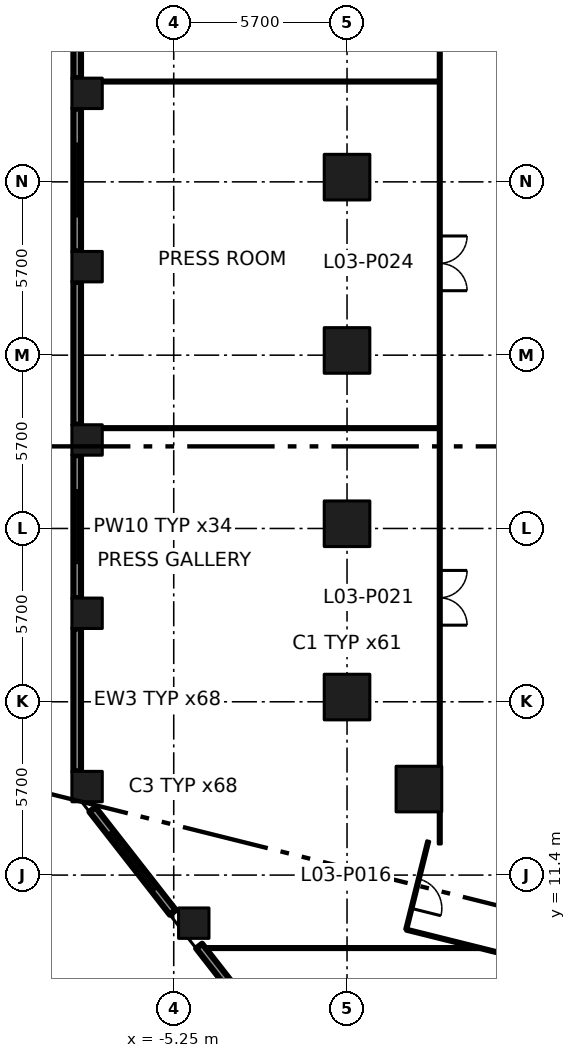
"""IFC4 building model, lengths in metres.
Left out: names, types, materials, properties, quantities, classifications, styles, units other than length and angle.
Written with IfcOpenShell. Run it as: python <this file> out.ifc"""

import sys

from ifc_helpers import new_model, si_unit, direction, frame, frame_2d, origin, origin_2d, place, context, subcontext, project, spatial, rectangle, extrude, element, fill, save


model = new_model("IFC4")
c1 = context("Model", 3, precision=1e-05, world=origin(), true_north=direction((0.0, 1.0)))
c2 = subcontext(c1, "Body", "Model", "MODEL_VIEW")
j1 = project(units=[si_unit("LENGTHUNIT", "METRE"), si_unit("PLANEANGLEUNIT", "RADIAN")], contexts=[c1])
p1 = place(None, origin())
s1 = spatial("IfcSite", under=j1, at=p1, CompositionType="ELEMENT")
p2 = place(p1, origin())
s2 = spatial("IfcBuilding", under=s1, at=p2, CompositionType="ELEMENT")
p3 = place(p2, frame((0.0, 0.0, 18.6)))
s3 = spatial("IfcBuildingStorey", under=s2, at=p3, CompositionType="ELEMENT", Elevation=18.6)
for number, where, z_axis, x_axis in (
    (1, (0.45, 17.255, 0.0), (0.0, 0.0, 1.0), (1.0, 0.0, 0.0)),
    (2, (0.45, 22.955, 0.0), (0.0, 0.0, 1.0), (1.0, 0.0, 0.0)),
    (3, (0.45, 28.655, 0.0), (0.0, 0.0, 1.0), (1.0, 0.0, 0.0)),
    (4, (0.45, 34.355, 0.0), (0.0, 0.0, 1.0), (1.0, 0.0, 0.0)),
    (5, (2.814, 14.229, 0.0), (0.0, 0.0, 1.0), (1.0, 0.0, 0.0)),
):
    element("IfcColumn", number, at=place(p3, frame(where, z_axis=z_axis, x_axis=x_axis)), inside=s3, PredefinedType="COLUMN", context=c2, shape_type="SweptSolid", body=[
        extrude(rectangle(XDim=1.5, YDim=1.5, at=origin_2d()), origin(), (0.0, 0.0, 1.0), 4.8),
    ])
for number, where, z_axis, x_axis in (
    (6, (-8.1, 14.311, 0.0), (0.0, 0.0, 1.0), (1.0, 0.0, 0.0)),
    (7, (-8.1, 20.011, 0.0), (0.0, 0.0, 1.0), (1.0, 0.0, 0.0)),
    (8, (-8.1, 25.711, 0.0), (0.0, 0.0, 1.0), (1.0, 0.0, 0.0)),
    (9, (-8.1, 31.411, 0.0), (0.0, 0.0, 1.0), (1.0, 0.0, 0.0)),
    (10, (-8.1, 37.111, 0.0), (0.0, 0.0, 1.0), (1.0, 0.0, 0.0)),
    (11, (-4.591, 9.819, 0.0), (0.0, 0.0, 1.0), (1.0, 0.0, 0.0)),
):
    element("IfcColumn", number, at=place(p3, frame(where, z_axis=z_axis, x_axis=x_axis)), inside=s3, PredefinedType="COLUMN", context=c2, shape_type="SweptSolid", body=[
        extrude(rectangle(XDim=1.0, YDim=1.0, at=origin_2d()), origin(), (0.0, 0.0, 1.0), 4.8),
    ])
p4 = place(p3, frame((2.395, 9.606, 0.0), z_axis=(0.0, 0.0, 1.0), x_axis=(0.970293932043, -0.241929091763, 0.0)))
e12 = element("IfcWall", 12, at=p4, inside=s3, PredefinedType="PARTITIONING", context=c2, shape_type="SweptSolid", body=[
    extrude(rectangle(XDim=16.86, YDim=0.1, at=frame_2d((8.43, 0.0))), origin(), (0.0, 0.0, 1.0), 4.35),
])
p5 = place(p4, frame((7.744, 0.0, 0.0)))
e13 = element("IfcOpeningElement", 13, at=p5, cuts=e12, PredefinedType="OPENING", context=c2, shape_type="SweptSolid", body=[
    extrude(rectangle(XDim=1.8, YDim=2.1, at=frame_2d((0.9, 1.05))), frame((0.0, 0.06, 0.0), z_axis=(0.0, -1.0, 0.0), x_axis=(1.0, 0.0, 0.0)), (0.0, 0.0, 1.0), 0.12),
])
p6 = place(p4, frame((13.344, 0.0, 0.0)))
e14 = element("IfcOpeningElement", 14, at=p6, cuts=e12, PredefinedType="OPENING", context=c2, shape_type="SweptSolid", body=[
    extrude(rectangle(XDim=1.0, YDim=2.1, at=frame_2d((0.5, 1.05))), frame((0.0, 0.06, 0.0), z_axis=(0.0, -1.0, 0.0), x_axis=(1.0, 0.0, 0.0)), (0.0, 0.0, 1.0), 0.12),
])
p7 = place(p3, frame((3.121, 12.517, 0.0), z_axis=(0.0, 0.0, 1.0), x_axis=(-0.241999491975, -0.970276376031, 0.0)))
e15 = element("IfcWall", 15, at=p7, inside=s3, PredefinedType="PARTITIONING", context=c2, shape_type="SweptSolid", body=[
    extrude(rectangle(XDim=3.0, YDim=0.1, at=frame_2d((1.5, 0.0))), origin(), (0.0, 0.0, 1.0), 4.35),
])
p8 = place(p7, frame((1.28, 0.0, 0.0)))
e16 = element("IfcOpeningElement", 16, at=p8, cuts=e15, PredefinedType="OPENING", context=c2, shape_type="SweptSolid", body=[
    extrude(rectangle(XDim=1.0, YDim=2.1, at=frame_2d((0.5, 1.05))), frame((0.0, 0.06, 0.0), z_axis=(0.0, -1.0, 0.0), x_axis=(1.0, 0.0, 0.0)), (0.0, 0.0, 1.0), 0.12),
])
p9 = place(p3, frame((3.5, 13.459, 0.0), z_axis=(0.0, 0.0, 1.0), x_axis=(0.0, -1.0, 0.0)))
e17 = element("IfcWall", 17, at=p9, inside=s3, PredefinedType="PARTITIONING", context=c2, shape_type="SweptSolid", body=[
    extrude(rectangle(XDim=1.036, YDim=0.1, at=frame_2d((0.518, 0.0))), origin(), (0.0, 0.0, 1.0), 4.35),
])
p10 = place(p3, frame((3.5, 41.4, 0.0), z_axis=(0.0, 0.0, 1.0), x_axis=(0.0, -1.0, 0.0)))
e18 = element("IfcWall", 18, at=p10, inside=s3, PredefinedType="PARTITIONING", context=c2, shape_type="SweptSolid", body=[
    extrude(rectangle(XDim=26.401, YDim=0.1, at=frame_2d((13.2, 0.0))), origin(), (0.0, 0.0, 1.0), 4.35),
])
p11 = place(p10, frame((19.98, 0.0, 0.0)))
e19 = element("IfcOpeningElement", 19, at=p11, cuts=e18, PredefinedType="OPENING", context=c2, shape_type="SweptSolid", body=[
    extrude(rectangle(XDim=1.8, YDim=2.1, at=frame_2d((0.9, 1.05))), frame((0.0, 0.06, 0.0), z_axis=(0.0, -1.0, 0.0), x_axis=(1.0, 0.0, 0.0)), (0.0, 0.0, 1.0), 0.12),
])
p12 = place(p10, frame((8.98, 0.0, 0.0)))
e20 = element("IfcOpeningElement", 20, at=p12, cuts=e18, PredefinedType="OPENING", context=c2, shape_type="SweptSolid", body=[
    extrude(rectangle(XDim=1.8, YDim=2.1, at=frame_2d((0.9, 1.05))), frame((0.0, 0.06, 0.0), z_axis=(0.0, -1.0, 0.0), x_axis=(1.0, 0.0, 0.0)), (0.0, 0.0, 1.0), 0.12),
])
p13 = place(p3, frame((-4.205, 9.0, 0.0), z_axis=(0.0, 0.0, 1.0), x_axis=(1.0, 0.0, 0.0)))
e21 = element("IfcWall", 21, at=p13, inside=s3, PredefinedType="PARTITIONING", context=c2, shape_type="SweptSolid", body=[
    extrude(rectangle(XDim=9.03, YDim=0.1, at=frame_2d((4.515, 0.0))), origin(), (0.0, 0.0, 1.0), 4.35),
])
for number, where, z_axis, x_axis in (
    (22, (3.45, 26.1, 0.0), (0.0, 0.0, 1.0), (-1.0, 0.0, 0.0)),
    (23, (3.45, 37.5, 0.0), (0.0, 0.0, 1.0), (-1.0, 0.0, 0.0)),
):
    element("IfcWall", number, at=place(p3, frame(where, z_axis=z_axis, x_axis=x_axis)), inside=s3, PredefinedType="PARTITIONING", context=c2, shape_type="SweptSolid", body=[
        extrude(rectangle(XDim=11.03, YDim=0.1, at=frame_2d((5.515, 0.0))), origin(), (0.0, 0.0, 1.0), 4.35),
    ])
p14 = place(p3, frame((-8.425, 42.311, 0.0), z_axis=(0.0, 0.0, 1.0), x_axis=(0.0, -1.0, 0.0)))
e24 = element("IfcWall", 24, at=p14, inside=s3, PredefinedType="SOLIDWALL", context=c2, shape_type="SweptSolid", body=[
    extrude(rectangle(XDim=4.7, YDim=0.25, at=frame_2d((2.35, 0.0))), origin(), (0.0, 0.0, 1.0), 3.45),
])
p15 = place(p3, frame((-8.425, 36.611, 0.0), z_axis=(0.0, 0.0, 1.0), x_axis=(0.0, -1.0, 0.0)))
e25 = element("IfcWall", 25, at=p15, inside=s3, PredefinedType="SOLIDWALL", context=c2, shape_type="SweptSolid", body=[
    extrude(rectangle(XDim=4.7, YDim=0.25, at=frame_2d((2.35, 0.0))), origin(), (0.0, 0.0, 1.0), 3.45),
])
p16 = place(p15, frame((1.15, 0.0, 0.9)))
e26 = element("IfcOpeningElement", 26, at=p16, cuts=e25, PredefinedType="OPENING", context=c2, shape_type="SweptSolid", body=[
    extrude(rectangle(XDim=2.4, YDim=2.1, at=frame_2d((1.2, 1.05))), frame((0.0, 0.135, 0.0), z_axis=(0.0, -1.0, 0.0), x_axis=(1.0, 0.0, 0.0)), (0.0, 0.0, 1.0), 0.27),
])
p17 = place(p3, frame((-8.425, 30.911, 0.0), z_axis=(0.0, 0.0, 1.0), x_axis=(0.0, -1.0, 0.0)))
e27 = element("IfcWall", 27, at=p17, inside=s3, PredefinedType="SOLIDWALL", context=c2, shape_type="SweptSolid", body=[
    extrude(rectangle(XDim=4.7, YDim=0.25, at=frame_2d((2.35, 0.0))), origin(), (0.0, 0.0, 1.0), 3.45),
])
p18 = place(p3, frame((-8.425, 25.211, 0.0), z_axis=(0.0, 0.0, 1.0), x_axis=(0.0, -1.0, 0.0)))
e28 = element("IfcWall", 28, at=p18, inside=s3, PredefinedType="SOLIDWALL", context=c2, shape_type="SweptSolid", body=[
    extrude(rectangle(XDim=4.7, YDim=0.25, at=frame_2d((2.35, 0.0))), origin(), (0.0, 0.0, 1.0), 3.45),
])
p19 = place(p18, frame((1.15, 0.0, 0.9)))
e29 = element("IfcOpeningElement", 29, at=p19, cuts=e28, PredefinedType="OPENING", context=c2, shape_type="SweptSolid", body=[
    extrude(rectangle(XDim=2.4, YDim=2.1, at=frame_2d((1.2, 1.05))), frame((0.0, 0.135, 0.0), z_axis=(0.0, -1.0, 0.0), x_axis=(1.0, 0.0, 0.0)), (0.0, 0.0, 1.0), 0.27),
])
p20 = place(p3, frame((-8.425, 19.511, 0.0), z_axis=(0.0, 0.0, 1.0), x_axis=(0.0, -1.0, 0.0)))
e30 = element("IfcWall", 30, at=p20, inside=s3, PredefinedType="SOLIDWALL", context=c2, shape_type="SweptSolid", body=[
    extrude(rectangle(XDim=4.7, YDim=0.25, at=frame_2d((2.35, 0.0))), origin(), (0.0, 0.0, 1.0), 3.45),
])
p21 = place(p3, frame((-7.924, 13.558, 0.0), z_axis=(0.0, 0.0, 1.0), x_axis=(0.615603242749, -0.788056246417, 0.0)))
e31 = element("IfcWall", 31, at=p21, inside=s3, PredefinedType="SOLIDWALL", context=c2, shape_type="SweptSolid", body=[
    extrude(rectangle(XDim=4.297, YDim=0.25, at=frame_2d((2.148, 0.0))), origin(), (0.0, 0.0, 1.0), 3.45),
])
p22 = place(p21, frame((0.948, 0.0, 0.9)))
e32 = element("IfcOpeningElement", 32, at=p22, cuts=e31, PredefinedType="OPENING", context=c2, shape_type="SweptSolid", body=[
    extrude(rectangle(XDim=2.4, YDim=2.1, at=frame_2d((1.2, 1.05))), frame((0.0, 0.135, 0.0), z_axis=(0.0, -1.0, 0.0), x_axis=(1.0, 0.0, 0.0)), (0.0, 0.0, 1.0), 0.27),
])
p23 = place(p3, frame((-4.415, 9.066, 0.0), z_axis=(0.0, 0.0, 1.0), x_axis=(0.615713519567, -0.787970089421, 0.0)))
e33 = element("IfcWall", 33, at=p23, inside=s3, PredefinedType="SOLIDWALL", context=c2, shape_type="SweptSolid", body=[
    extrude(rectangle(XDim=4.296, YDim=0.25, at=frame_2d((2.148, 0.0))), origin(), (0.0, 0.0, 1.0), 3.45),
])
p24 = place(p8, origin())
e34 = element("IfcDoor", 34, at=p24, inside=s3, OperationType="SINGLE_SWING_RIGHT", PredefinedType="DOOR", context=c2, shape_type="SweptSolid", body=[
    extrude(rectangle(XDim=1.0, YDim=2.1, at=frame_2d((0.5, 1.05))), frame((0.0, 0.025, 0.0), z_axis=(0.0, -1.0, 0.0), x_axis=(1.0, 0.0, 0.0)), (0.0, 0.0, 1.0), 0.05),
])
fill(e16, e34)
p25 = place(p11, origin())
e35 = element("IfcDoor", 35, at=p25, inside=s3, OperationType="DOUBLE_DOOR_SINGLE_SWING", PredefinedType="DOOR", context=c2, shape_type="SweptSolid", body=[
    extrude(rectangle(XDim=1.8, YDim=2.1, at=frame_2d((0.9, 1.05))), frame((0.0, 0.025, 0.0), z_axis=(0.0, -1.0, 0.0), x_axis=(1.0, 0.0, 0.0)), (0.0, 0.0, 1.0), 0.05),
])
fill(e19, e35)
p26 = place(p12, origin())
e36 = element("IfcDoor", 36, at=p26, inside=s3, OperationType="DOUBLE_DOOR_SINGLE_SWING", PredefinedType="DOOR", context=c2, shape_type="SweptSolid", body=[
    extrude(rectangle(XDim=1.8, YDim=2.1, at=frame_2d((0.9, 1.05))), frame((0.0, 0.025, 0.0), z_axis=(0.0, -1.0, 0.0), x_axis=(1.0, 0.0, 0.0)), (0.0, 0.0, 1.0), 0.05),
])
fill(e20, e36)
p27 = place(p16, origin())
e37 = element("IfcWindow", 37, at=p27, inside=s3, PartitioningType="DOUBLE_PANEL_VERTICAL", PredefinedType="WINDOW", context=c2, shape_type="SweptSolid", body=[
    extrude(rectangle(XDim=2.4, YDim=2.1, at=frame_2d((1.2, 1.05))), frame((0.0, 0.03, 0.0), z_axis=(0.0, -1.0, 0.0), x_axis=(1.0, 0.0, 0.0)), (0.0, 0.0, 1.0), 0.06),
])
fill(e26, e37)
p28 = place(p19, origin())
e38 = element("IfcWindow", 38, at=p28, inside=s3, PartitioningType="DOUBLE_PANEL_VERTICAL", PredefinedType="WINDOW", context=c2, shape_type="SweptSolid", body=[
    extrude(rectangle(XDim=2.4, YDim=2.1, at=frame_2d((1.2, 1.05))), frame((0.0, 0.03, 0.0), z_axis=(0.0, -1.0, 0.0), x_axis=(1.0, 0.0, 0.0)), (0.0, 0.0, 1.0), 0.06),
])
fill(e29, e38)
p29 = place(p22, origin())
e39 = element("IfcWindow", 39, at=p29, inside=s3, PartitioningType="DOUBLE_PANEL_VERTICAL", PredefinedType="WINDOW", context=c2, shape_type="SweptSolid", body=[
    extrude(rectangle(XDim=2.4, YDim=2.1, at=frame_2d((1.2, 1.05))), frame((0.0, 0.03, 0.0), z_axis=(0.0, -1.0, 0.0), x_axis=(1.0, 0.0, 0.0)), (0.0, 0.0, 1.0), 0.06),
])
fill(e32, e39)
save(model, sys.argv[1])
